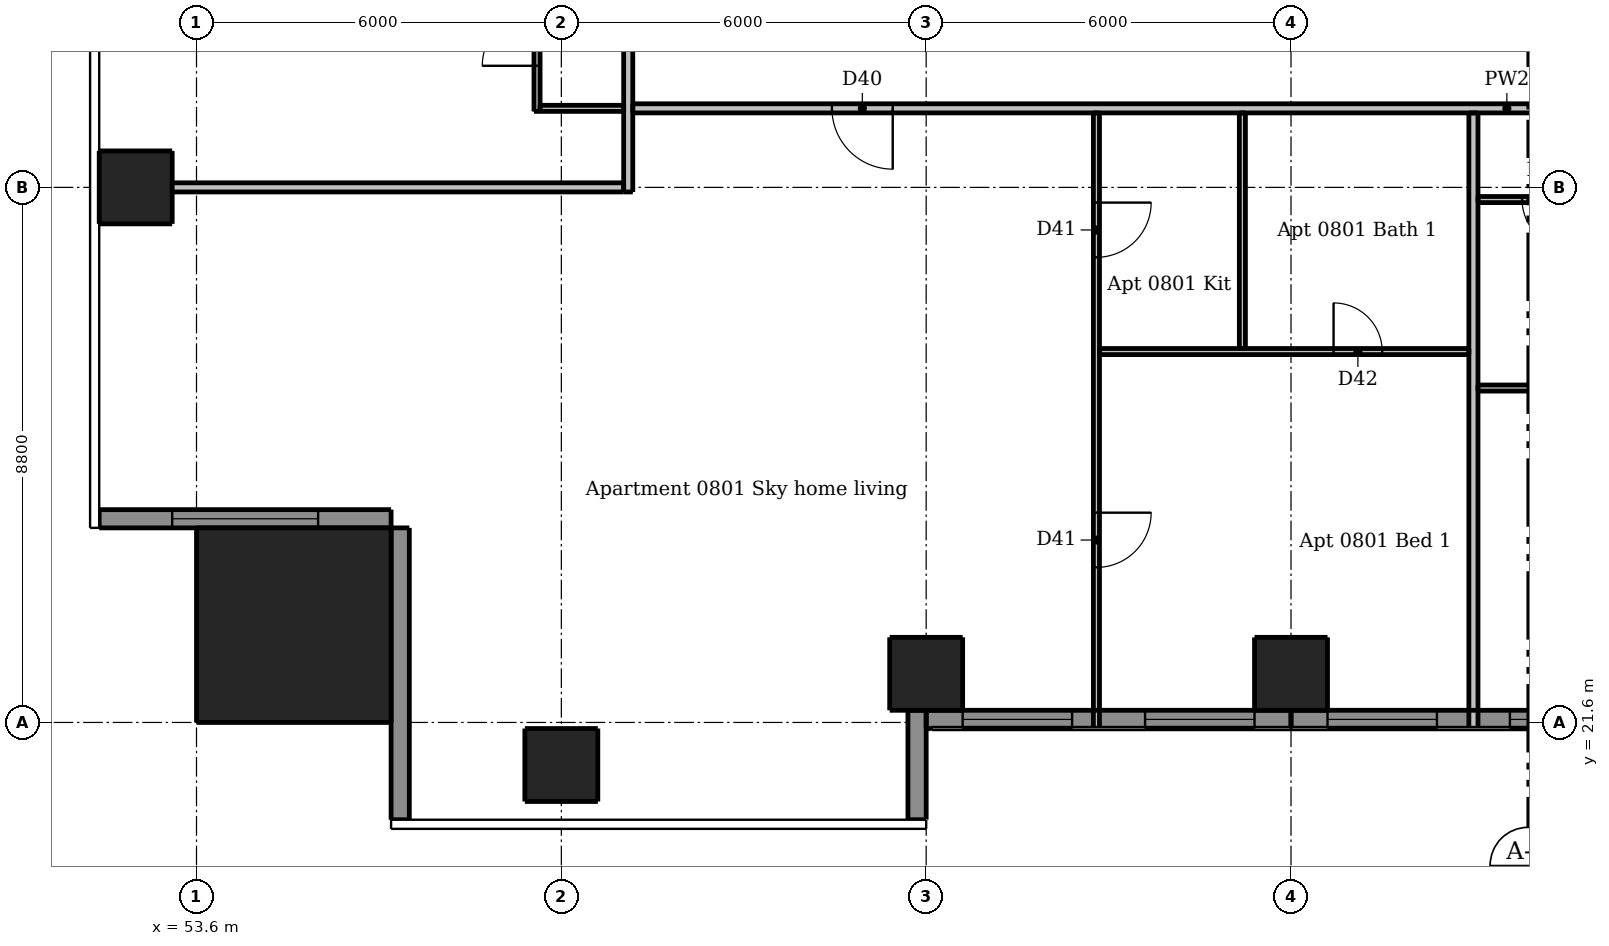
"""IFC4 building model, lengths in metres.
Left out: names, types, materials, properties, quantities, classifications, styles, units other than length and angle.
Written with IfcOpenShell. Run it as: python <this file> out.ifc"""

import sys

from ifc_helpers import new_model, si_unit, direction, frame, frame_2d, origin, origin_2d, place, context, subcontext, project, spatial, rectangle, extrude, element, fill, save


model = new_model("IFC4")
c1 = context("Model", 3, precision=1e-05, world=origin(), true_north=direction((0.0, 1.0)))
c2 = subcontext(c1, "Body", "Model", "MODEL_VIEW")
j1 = project(units=[si_unit("LENGTHUNIT", "METRE"), si_unit("PLANEANGLEUNIT", "RADIAN")], contexts=[c1])
p1 = place(None, origin())
s1 = spatial("IfcSite", under=j1, at=p1, CompositionType="ELEMENT")
p2 = place(p1, origin())
s2 = spatial("IfcBuilding", under=s1, at=p2, CompositionType="ELEMENT")
p3 = place(p2, frame((0.0, 0.0, 33.4)))
s3 = spatial("IfcBuildingStorey", under=s2, at=p3, CompositionType="ELEMENT", Elevation=33.4)
for number, where, z_axis, x_axis in (
    (1, (59.6, 20.9, 0.0), (0.0, 0.0, 1.0), (1.0, 0.0, 0.0)),
    (2, (65.6, 22.4, 0.0), (0.0, 0.0, 1.0), (1.0, 0.0, 0.0)),
    (3, (71.6, 22.4, 0.0), (0.0, 0.0, 1.0), (1.0, 0.0, 0.0)),
    (4, (52.6, 30.4, 0.0), (0.0, 0.0, 1.0), (1.0, 0.0, 0.0)),
):
    element("IfcColumn", number, at=place(p3, frame(where, z_axis=z_axis, x_axis=x_axis)), inside=s3, PredefinedType="COLUMN", context=c2, shape_type="SweptSolid", body=[
        extrude(rectangle(XDim=1.2, YDim=1.2, at=origin_2d()), origin(), (0.0, 0.0, 1.0), 3.05),
    ])
p4 = place(p3, frame((55.2, 23.2, 0.0), z_axis=(0.0, 0.0, 1.0), x_axis=(1.0, 0.0, 0.0)))
e5 = element("IfcColumn", 5, at=p4, inside=s3, PredefinedType="COLUMN", context=c2, shape_type="SweptSolid", body=[
    extrude(rectangle(XDim=3.2, YDim=3.2, at=origin_2d()), origin(), (0.0, 0.0, 1.0), 3.3),
])
p5 = place(p3, frame((65.45, 20.0, 0.0), z_axis=(0.0, 0.0, 1.0), x_axis=(0.0, 1.0, 0.0)))
e6 = element("IfcWall", 6, at=p5, inside=s3, PredefinedType="SOLIDWALL", context=c2, shape_type="SweptSolid", body=[
    extrude(rectangle(XDim=1.8, YDim=0.3, at=frame_2d((0.9, 0.0))), origin(), (0.0, 0.0, 1.0), 3.05),
])
p6 = place(p3, frame((52.0, 24.95, 0.0), z_axis=(0.0, 0.0, 1.0), x_axis=(1.0, 0.0, 0.0)))
e7 = element("IfcWall", 7, at=p6, inside=s3, PredefinedType="SOLIDWALL", context=c2, shape_type="SweptSolid", body=[
    extrude(rectangle(XDim=4.8, YDim=0.3, at=frame_2d((2.4, 0.0))), origin(), (0.0, 0.0, 1.0), 3.05),
])
p7 = place(p6, frame((1.2, 0.0, 0.15)))
e8 = element("IfcOpeningElement", 8, at=p7, cuts=e7, PredefinedType="OPENING", context=c2, shape_type="SweptSolid", body=[
    extrude(rectangle(XDim=2.4, YDim=2.1, at=frame_2d((1.2, 1.05))), frame((0.0, 0.16, 0.0), z_axis=(0.0, -1.0, 0.0), x_axis=(1.0, 0.0, 0.0)), (0.0, 0.0, 1.0), 0.32),
])
p8 = place(p3, frame((56.95, 24.8, 0.0), z_axis=(0.0, 0.0, 1.0), x_axis=(0.0, -1.0, 0.0)))
e9 = element("IfcWall", 9, at=p8, inside=s3, PredefinedType="SOLIDWALL", context=c2, shape_type="SweptSolid", body=[
    extrude(rectangle(XDim=4.8, YDim=0.3, at=frame_2d((2.4, 0.0))), origin(), (0.0, 0.0, 1.0), 3.05),
])
p9 = place(p3, frame((65.6, 21.65, 0.0), z_axis=(0.0, 0.0, 1.0), x_axis=(1.0, 0.0, 0.0)))
e10 = element("IfcWall", 10, at=p9, inside=s3, PredefinedType="SOLIDWALL", context=c2, shape_type="SweptSolid", body=[
    extrude(rectangle(XDim=6.0, YDim=0.3, at=frame_2d((3.0, 0.0))), origin(), (0.0, 0.0, 1.0), 3.05),
])
p10 = place(p9, frame((0.6, 0.0, 0.15)))
e11 = element("IfcOpeningElement", 11, at=p10, cuts=e10, PredefinedType="OPENING", context=c2, shape_type="SweptSolid", body=[
    extrude(rectangle(XDim=1.8, YDim=2.1, at=frame_2d((0.9, 1.05))), frame((0.0, 0.16, 0.0), z_axis=(0.0, -1.0, 0.0), x_axis=(1.0, 0.0, 0.0)), (0.0, 0.0, 1.0), 0.32),
])
p11 = place(p9, frame((3.6, 0.0, 0.15)))
e12 = element("IfcOpeningElement", 12, at=p11, cuts=e10, PredefinedType="OPENING", context=c2, shape_type="SweptSolid", body=[
    extrude(rectangle(XDim=1.8, YDim=2.1, at=frame_2d((0.9, 1.05))), frame((0.0, 0.16, 0.0), z_axis=(0.0, -1.0, 0.0), x_axis=(1.0, 0.0, 0.0)), (0.0, 0.0, 1.0), 0.32),
])
p12 = place(p3, frame((71.6, 21.65, 0.0), z_axis=(0.0, 0.0, 1.0), x_axis=(1.0, 0.0, 0.0)))
e13 = element("IfcWall", 13, at=p12, inside=s3, PredefinedType="SOLIDWALL", context=c2, shape_type="SweptSolid", body=[
    extrude(rectangle(XDim=5.7, YDim=0.3, at=frame_2d((2.85, 0.0))), origin(), (0.0, 0.0, 1.0), 3.05),
])
p13 = place(p12, frame((0.6, 0.0, 0.15)))
e14 = element("IfcOpeningElement", 14, at=p13, cuts=e13, PredefinedType="OPENING", context=c2, shape_type="SweptSolid", body=[
    extrude(rectangle(XDim=1.8, YDim=2.1, at=frame_2d((0.9, 1.05))), frame((0.0, 0.16, 0.0), z_axis=(0.0, -1.0, 0.0), x_axis=(1.0, 0.0, 0.0)), (0.0, 0.0, 1.0), 0.32),
])
p14 = place(p12, frame((3.6, 0.0, 0.15)))
e15 = element("IfcOpeningElement", 15, at=p14, cuts=e13, PredefinedType="OPENING", context=c2, shape_type="SweptSolid", body=[
    extrude(rectangle(XDim=1.8, YDim=2.1, at=frame_2d((0.9, 1.05))), frame((0.0, 0.16, 0.0), z_axis=(0.0, -1.0, 0.0), x_axis=(1.0, 0.0, 0.0)), (0.0, 0.0, 1.0), 0.32),
])
p15 = place(p3, frame((59.2, 31.65, 0.0), z_axis=(0.0, 0.0, 1.0), x_axis=(0.0, 1.0, 0.0)))
e16 = element("IfcWall", 16, at=p15, inside=s3, PredefinedType="PARTITIONING", context=c2, shape_type="SweptSolid", body=[
    extrude(rectangle(XDim=16.675, YDim=0.1, at=frame_2d((8.337, 0.0))), origin(), (0.0, 0.0, 1.0), 3.05),
])
p16 = place(p15, frame((9.7, 0.0, 0.0)))
e17 = element("IfcOpeningElement", 17, at=p16, cuts=e16, PredefinedType="OPENING", context=c2, shape_type="SweptSolid", body=[
    extrude(rectangle(XDim=0.9, YDim=2.1, at=frame_2d((0.45, 1.05))), frame((0.0, 0.06, 0.0), z_axis=(0.0, -1.0, 0.0), x_axis=(1.0, 0.0, 0.0)), (0.0, 0.0, 1.0), 0.12),
])
p17 = place(p15, frame((14.8, 0.0, 0.0)))
e18 = element("IfcOpeningElement", 18, at=p17, cuts=e16, PredefinedType="OPENING", context=c2, shape_type="SweptSolid", body=[
    extrude(rectangle(XDim=0.9, YDim=2.1, at=frame_2d((0.45, 1.05))), frame((0.0, 0.06, 0.0), z_axis=(0.0, -1.0, 0.0), x_axis=(1.0, 0.0, 0.0)), (0.0, 0.0, 1.0), 0.12),
])
p18 = place(p15, frame((5.25, 0.0, 0.0)))
e19 = element("IfcOpeningElement", 19, at=p18, cuts=e16, PredefinedType="OPENING", context=c2, shape_type="SweptSolid", body=[
    extrude(rectangle(XDim=0.8, YDim=2.1, at=frame_2d((0.4, 1.05))), frame((0.0, 0.06, 0.0), z_axis=(0.0, -1.0, 0.0), x_axis=(1.0, 0.0, 0.0)), (0.0, 0.0, 1.0), 0.12),
])
p19 = place(p15, frame((0.75, 0.0, 0.0)))
e20 = element("IfcOpeningElement", 20, at=p19, cuts=e16, PredefinedType="OPENING", context=c2, shape_type="SweptSolid", body=[
    extrude(rectangle(XDim=0.9, YDim=2.1, at=frame_2d((0.45, 1.05))), frame((0.0, 0.06, 0.0), z_axis=(0.0, -1.0, 0.0), x_axis=(1.0, 0.0, 0.0)), (0.0, 0.0, 1.0), 0.12),
])
p20 = place(p15, frame((3.15, 0.0, 0.0)))
e21 = element("IfcOpeningElement", 21, at=p20, cuts=e16, PredefinedType="OPENING", context=c2, shape_type="SweptSolid", body=[
    extrude(rectangle(XDim=0.8, YDim=2.1, at=frame_2d((0.4, 1.05))), frame((0.0, 0.06, 0.0), z_axis=(0.0, -1.0, 0.0), x_axis=(1.0, 0.0, 0.0)), (0.0, 0.0, 1.0), 0.12),
])
p21 = place(p3, frame((68.4, 31.625, 0.0), z_axis=(0.0, 0.0, 1.0), x_axis=(0.0, -1.0, 0.0)))
e22 = element("IfcWall", 22, at=p21, inside=s3, PredefinedType="PARTITIONING", context=c2, shape_type="SweptSolid", body=[
    extrude(rectangle(XDim=10.125, YDim=0.1, at=frame_2d((5.062, 0.0))), origin(), (0.0, 0.0, 1.0), 3.05),
])
p22 = place(p21, frame((1.475, 0.0, 0.0)))
e23 = element("IfcOpeningElement", 23, at=p22, cuts=e22, PredefinedType="OPENING", context=c2, shape_type="SweptSolid", body=[
    extrude(rectangle(XDim=0.9, YDim=2.1, at=frame_2d((0.45, 1.05))), frame((0.0, 0.06, 0.0), z_axis=(0.0, -1.0, 0.0), x_axis=(1.0, 0.0, 0.0)), (0.0, 0.0, 1.0), 0.12),
])
p23 = place(p21, frame((6.575, 0.0, 0.0)))
e24 = element("IfcOpeningElement", 24, at=p23, cuts=e22, PredefinedType="OPENING", context=c2, shape_type="SweptSolid", body=[
    extrude(rectangle(XDim=0.9, YDim=2.1, at=frame_2d((0.45, 1.05))), frame((0.0, 0.06, 0.0), z_axis=(0.0, -1.0, 0.0), x_axis=(1.0, 0.0, 0.0)), (0.0, 0.0, 1.0), 0.12),
])
p24 = place(p3, frame((70.8, 27.75, 0.0), z_axis=(0.0, 0.0, 1.0), x_axis=(0.0, 1.0, 0.0)))
e25 = element("IfcWall", 25, at=p24, inside=s3, PredefinedType="PARTITIONING", context=c2, shape_type="SweptSolid", body=[
    extrude(rectangle(XDim=3.875, YDim=0.1, at=frame_2d((1.938, 0.0))), origin(), (0.0, 0.0, 1.0), 3.05),
])
p25 = place(p3, frame((59.25, 31.7, 0.0), z_axis=(0.0, 0.0, 1.0), x_axis=(1.0, 0.0, 0.0)))
e26 = element("IfcWall", 26, at=p25, inside=s3, PredefinedType="PARTITIONING", context=c2, shape_type="SweptSolid", body=[
    extrude(rectangle(XDim=1.375, YDim=0.1, at=frame_2d((0.688, 0.0))), origin(), (0.0, 0.0, 1.0), 3.05),
])
p26 = place(p3, frame((88.25, 30.2, 0.0), z_axis=(0.0, 0.0, 1.0), x_axis=(-1.0, 0.0, 0.0)))
e27 = element("IfcWall", 27, at=p26, inside=s3, PredefinedType="PARTITIONING", context=c2, shape_type="SweptSolid", body=[
    extrude(rectangle(XDim=13.575, YDim=0.1, at=frame_2d((6.788, 0.0))), origin(), (0.0, 0.0, 1.0), 3.05),
])
p27 = place(p26, frame((7.5, 0.0, 0.0)))
e28 = element("IfcOpeningElement", 28, at=p27, cuts=e27, PredefinedType="OPENING", context=c2, shape_type="SweptSolid", body=[
    extrude(rectangle(XDim=0.9, YDim=2.1, at=frame_2d((0.45, 1.05))), frame((0.0, 0.06, 0.0), z_axis=(0.0, -1.0, 0.0), x_axis=(1.0, 0.0, 0.0)), (0.0, 0.0, 1.0), 0.12),
])
p28 = place(p26, frame((2.7, 0.0, 0.0)))
e29 = element("IfcOpeningElement", 29, at=p28, cuts=e27, PredefinedType="OPENING", context=c2, shape_type="SweptSolid", body=[
    extrude(rectangle(XDim=0.9, YDim=2.1, at=frame_2d((0.45, 1.05))), frame((0.0, 0.06, 0.0), z_axis=(0.0, -1.0, 0.0), x_axis=(1.0, 0.0, 0.0)), (0.0, 0.0, 1.0), 0.12),
])
p29 = place(p26, frame((0.35, 0.0, 0.0)))
e30 = element("IfcOpeningElement", 30, at=p29, cuts=e27, PredefinedType="OPENING", context=c2, shape_type="SweptSolid", body=[
    extrude(rectangle(XDim=0.9, YDim=2.1, at=frame_2d((0.45, 1.05))), frame((0.0, 0.06, 0.0), z_axis=(0.0, -1.0, 0.0), x_axis=(1.0, 0.0, 0.0)), (0.0, 0.0, 1.0), 0.12),
])
p30 = place(p26, frame((12.05, 0.0, 0.0)))
e31 = element("IfcOpeningElement", 31, at=p30, cuts=e27, PredefinedType="OPENING", context=c2, shape_type="SweptSolid", body=[
    extrude(rectangle(XDim=0.8, YDim=2.1, at=frame_2d((0.4, 1.05))), frame((0.0, 0.06, 0.0), z_axis=(0.0, -1.0, 0.0), x_axis=(1.0, 0.0, 0.0)), (0.0, 0.0, 1.0), 0.12),
])
p31 = place(p3, frame((68.45, 27.7, 0.0), z_axis=(0.0, 0.0, 1.0), x_axis=(1.0, 0.0, 0.0)))
e32 = element("IfcWall", 32, at=p31, inside=s3, PredefinedType="PARTITIONING", context=c2, shape_type="SweptSolid", body=[
    extrude(rectangle(XDim=6.075, YDim=0.1, at=frame_2d((3.038, 0.0))), origin(), (0.0, 0.0, 1.0), 3.05),
])
p32 = place(p31, frame((3.85, 0.0, 0.0)))
e33 = element("IfcOpeningElement", 33, at=p32, cuts=e32, PredefinedType="OPENING", context=c2, shape_type="SweptSolid", body=[
    extrude(rectangle(XDim=0.8, YDim=2.1, at=frame_2d((0.4, 1.05))), frame((0.0, 0.06, 0.0), z_axis=(0.0, -1.0, 0.0), x_axis=(1.0, 0.0, 0.0)), (0.0, 0.0, 1.0), 0.12),
])
p33 = place(p3, frame((74.675, 27.1, 0.0), z_axis=(0.0, 0.0, 1.0), x_axis=(1.0, 0.0, 0.0)))
e34 = element("IfcWall", 34, at=p33, inside=s3, PredefinedType="PARTITIONING", context=c2, shape_type="SweptSolid", body=[
    extrude(rectangle(XDim=2.275, YDim=0.1, at=frame_2d((1.137, 0.0))), origin(), (0.0, 0.0, 1.0), 3.05),
])
p34 = place(p3, frame((60.7, 30.325, 0.0), z_axis=(0.0, 0.0, 1.0), x_axis=(0.0, 1.0, 0.0)))
e35 = element("IfcWall", 35, at=p34, inside=s3, PredefinedType="PARTITIONING", context=c2, shape_type="SweptSolid", body=[
    extrude(rectangle(XDim=28.9, YDim=0.15, at=frame_2d((14.45, 0.0))), origin(), (0.0, 0.0, 1.0), 3.05),
])
p35 = place(p34, frame((9.225, 0.0, 0.0)))
e36 = element("IfcOpeningElement", 36, at=p35, cuts=e35, PredefinedType="OPENING", context=c2, shape_type="SweptSolid", body=[
    extrude(rectangle(XDim=1.0, YDim=2.1, at=frame_2d((0.5, 1.05))), frame((0.0, 0.085, 0.0), z_axis=(0.0, -1.0, 0.0), x_axis=(1.0, 0.0, 0.0)), (0.0, 0.0, 1.0), 0.17),
])
p36 = place(p34, frame((26.025, 0.0, 0.0)))
e37 = element("IfcOpeningElement", 37, at=p36, cuts=e35, PredefinedType="OPENING", context=c2, shape_type="SweptSolid", body=[
    extrude(rectangle(XDim=1.0, YDim=2.1, at=frame_2d((0.5, 1.05))), frame((0.0, 0.085, 0.0), z_axis=(0.0, -1.0, 0.0), x_axis=(1.0, 0.0, 0.0)), (0.0, 0.0, 1.0), 0.17),
])
p37 = place(p3, frame((74.6, 21.5, 0.0), z_axis=(0.0, 0.0, 1.0), x_axis=(0.0, 1.0, 0.0)))
e38 = element("IfcWall", 38, at=p37, inside=s3, PredefinedType="PARTITIONING", context=c2, shape_type="SweptSolid", body=[
    extrude(rectangle(XDim=10.125, YDim=0.15, at=frame_2d((5.062, 0.0))), origin(), (0.0, 0.0, 1.0), 3.05),
])
p38 = place(p3, frame((89.525, 31.7, 0.0), z_axis=(0.0, 0.0, 1.0), x_axis=(-1.0, 0.0, 0.0)))
e39 = element("IfcWall", 39, at=p38, inside=s3, PredefinedType="PARTITIONING", context=c2, shape_type="SweptSolid", body=[
    extrude(rectangle(XDim=28.75, YDim=0.15, at=frame_2d((14.375, 0.0))), origin(), (0.0, 0.0, 1.0), 3.05),
])
p39 = place(p38, frame((24.475, 0.0, 0.0)))
e40 = element("IfcOpeningElement", 40, at=p39, cuts=e39, PredefinedType="OPENING", context=c2, shape_type="SweptSolid", body=[
    extrude(rectangle(XDim=1.0, YDim=2.1, at=frame_2d((0.5, 1.05))), frame((0.0, 0.085, 0.0), z_axis=(0.0, -1.0, 0.0), x_axis=(1.0, 0.0, 0.0)), (0.0, 0.0, 1.0), 0.17),
])
p40 = place(p38, frame((7.575, 0.0, 0.0)))
e41 = element("IfcOpeningElement", 41, at=p40, cuts=e39, PredefinedType="OPENING", context=c2, shape_type="SweptSolid", body=[
    extrude(rectangle(XDim=1.0, YDim=2.1, at=frame_2d((0.5, 1.05))), frame((0.0, 0.085, 0.0), z_axis=(0.0, -1.0, 0.0), x_axis=(1.0, 0.0, 0.0)), (0.0, 0.0, 1.0), 0.17),
])
p41 = place(p3, frame((52.0, 30.4, 0.0), z_axis=(0.0, 0.0, 1.0), x_axis=(1.0, 0.0, 0.0)))
e42 = element("IfcWall", 42, at=p41, inside=s3, PredefinedType="PARTITIONING", context=c2, shape_type="SweptSolid", body=[
    extrude(rectangle(XDim=8.625, YDim=0.15, at=frame_2d((4.312, 0.0))), origin(), (0.0, 0.0, 1.0), 2.647),
])
p42 = place(p7, origin())
e43 = element("IfcWindow", 43, at=p42, inside=s3, PartitioningType="DOUBLE_PANEL_VERTICAL", PredefinedType="WINDOW", context=c2, shape_type="SweptSolid", body=[
    extrude(rectangle(XDim=2.4, YDim=2.1, at=frame_2d((1.2, 1.05))), frame((0.0, 0.03, 0.0), z_axis=(0.0, -1.0, 0.0), x_axis=(1.0, 0.0, 0.0)), (0.0, 0.0, 1.0), 0.06),
])
fill(e8, e43)
p43 = place(p10, origin())
e44 = element("IfcWindow", 44, at=p43, inside=s3, PartitioningType="DOUBLE_PANEL_VERTICAL", PredefinedType="WINDOW", context=c2, shape_type="SweptSolid", body=[
    extrude(rectangle(XDim=1.8, YDim=2.1, at=frame_2d((0.9, 1.05))), frame((0.0, 0.03, 0.0), z_axis=(0.0, -1.0, 0.0), x_axis=(1.0, 0.0, 0.0)), (0.0, 0.0, 1.0), 0.06),
])
fill(e11, e44)
p44 = place(p11, origin())
e45 = element("IfcWindow", 45, at=p44, inside=s3, PartitioningType="DOUBLE_PANEL_VERTICAL", PredefinedType="WINDOW", context=c2, shape_type="SweptSolid", body=[
    extrude(rectangle(XDim=1.8, YDim=2.1, at=frame_2d((0.9, 1.05))), frame((0.0, 0.03, 0.0), z_axis=(0.0, -1.0, 0.0), x_axis=(1.0, 0.0, 0.0)), (0.0, 0.0, 1.0), 0.06),
])
fill(e12, e45)
p45 = place(p13, origin())
e46 = element("IfcWindow", 46, at=p45, inside=s3, PartitioningType="DOUBLE_PANEL_VERTICAL", PredefinedType="WINDOW", context=c2, shape_type="SweptSolid", body=[
    extrude(rectangle(XDim=1.8, YDim=2.1, at=frame_2d((0.9, 1.05))), frame((0.0, 0.03, 0.0), z_axis=(0.0, -1.0, 0.0), x_axis=(1.0, 0.0, 0.0)), (0.0, 0.0, 1.0), 0.06),
])
fill(e14, e46)
p46 = place(p14, origin())
e47 = element("IfcWindow", 47, at=p46, inside=s3, PartitioningType="DOUBLE_PANEL_VERTICAL", PredefinedType="WINDOW", context=c2, shape_type="SweptSolid", body=[
    extrude(rectangle(XDim=1.8, YDim=2.1, at=frame_2d((0.9, 1.05))), frame((0.0, 0.03, 0.0), z_axis=(0.0, -1.0, 0.0), x_axis=(1.0, 0.0, 0.0)), (0.0, 0.0, 1.0), 0.06),
])
fill(e15, e47)
p47 = place(p39, origin())
e48 = element("IfcDoor", 48, at=p47, inside=s3, OperationType="SINGLE_SWING_LEFT", PredefinedType="DOOR", context=c2, shape_type="SweptSolid", body=[
    extrude(rectangle(XDim=1.0, YDim=2.1, at=frame_2d((0.5, 1.05))), frame((0.0, 0.025, 0.0), z_axis=(0.0, -1.0, 0.0), x_axis=(1.0, 0.0, 0.0)), (0.0, 0.0, 1.0), 0.05),
])
fill(e40, e48)
p48 = place(p22, origin())
e49 = element("IfcDoor", 49, at=p48, inside=s3, OperationType="SINGLE_SWING_LEFT", PredefinedType="DOOR", context=c2, shape_type="SweptSolid", body=[
    extrude(rectangle(XDim=0.9, YDim=2.1, at=frame_2d((0.45, 1.05))), frame((0.0, 0.025, 0.0), z_axis=(0.0, -1.0, 0.0), x_axis=(1.0, 0.0, 0.0)), (0.0, 0.0, 1.0), 0.05),
])
fill(e23, e49)
p49 = place(p23, origin())
e50 = element("IfcDoor", 50, at=p49, inside=s3, OperationType="SINGLE_SWING_LEFT", PredefinedType="DOOR", context=c2, shape_type="SweptSolid", body=[
    extrude(rectangle(XDim=0.9, YDim=2.1, at=frame_2d((0.45, 1.05))), frame((0.0, 0.025, 0.0), z_axis=(0.0, -1.0, 0.0), x_axis=(1.0, 0.0, 0.0)), (0.0, 0.0, 1.0), 0.05),
])
fill(e24, e50)
p50 = place(p32, origin())
e51 = element("IfcDoor", 51, at=p50, inside=s3, OperationType="SINGLE_SWING_LEFT", PredefinedType="DOOR", context=c2, shape_type="SweptSolid", body=[
    extrude(rectangle(XDim=0.8, YDim=2.1, at=frame_2d((0.4, 1.05))), frame((0.0, 0.025, 0.0), z_axis=(0.0, -1.0, 0.0), x_axis=(1.0, 0.0, 0.0)), (0.0, 0.0, 1.0), 0.05),
])
fill(e33, e51)
p51 = place(p30, origin())
e52 = element("IfcDoor", 52, at=p51, inside=s3, OperationType="SINGLE_SWING_LEFT", PredefinedType="DOOR", context=c2, shape_type="SweptSolid", body=[
    extrude(rectangle(XDim=0.8, YDim=2.1, at=frame_2d((0.4, 1.05))), frame((0.0, 0.025, 0.0), z_axis=(0.0, -1.0, 0.0), x_axis=(1.0, 0.0, 0.0)), (0.0, 0.0, 1.0), 0.05),
])
fill(e31, e52)
p52 = place(p19, origin())
e53 = element("IfcDoor", 53, at=p52, inside=s3, OperationType="SINGLE_SWING_LEFT", PredefinedType="DOOR", context=c2, shape_type="SweptSolid", body=[
    extrude(rectangle(XDim=0.9, YDim=2.1, at=frame_2d((0.45, 1.05))), frame((0.0, 0.025, 0.0), z_axis=(0.0, -1.0, 0.0), x_axis=(1.0, 0.0, 0.0)), (0.0, 0.0, 1.0), 0.05),
])
fill(e20, e53)
save(model, sys.argv[1])
